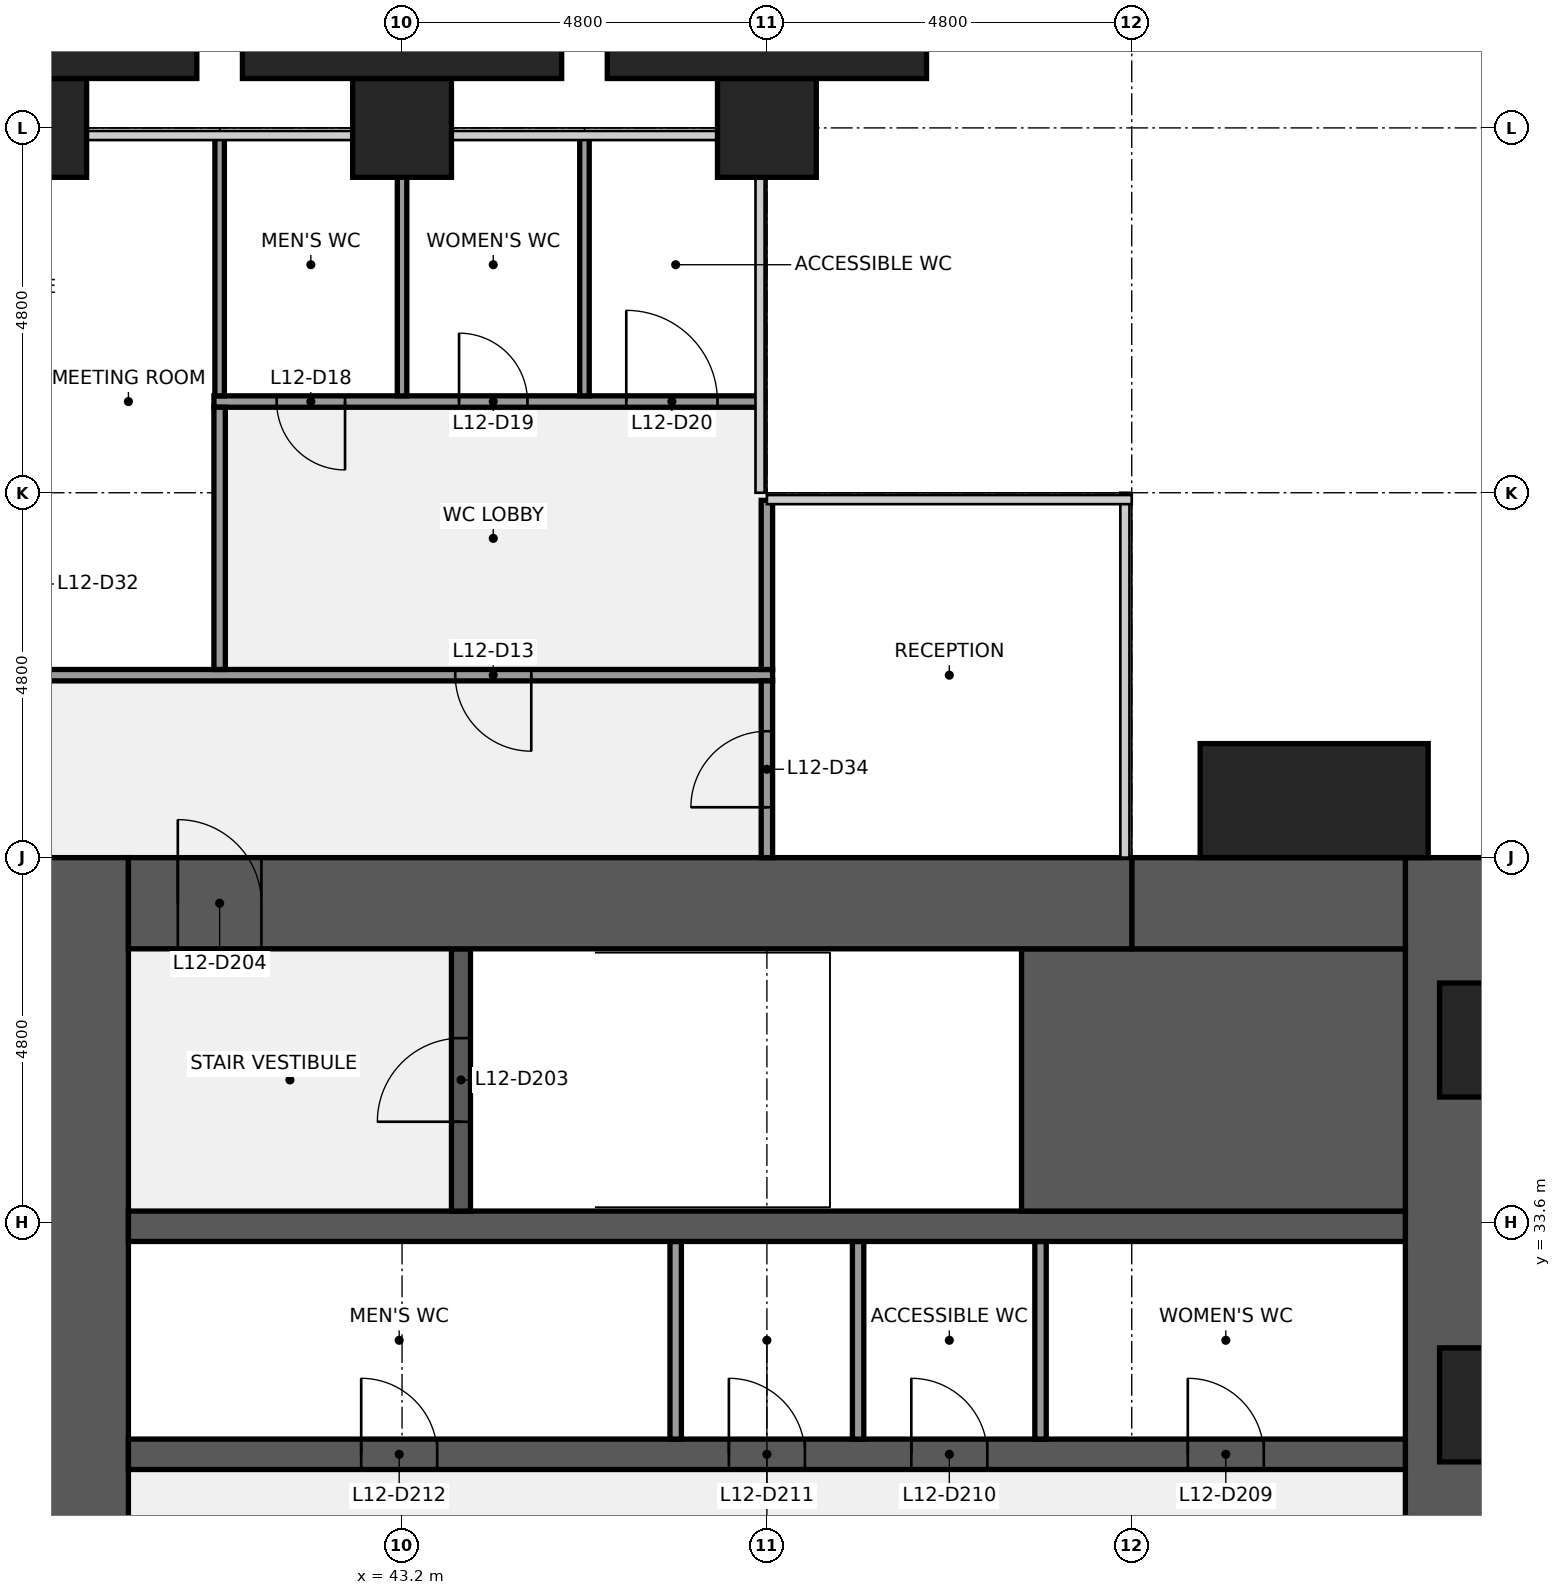
"""IFC4 building model, lengths in metres.
Left out: names, types, materials, properties, quantities, classifications, styles, units other than length and angle.
Written with IfcOpenShell. Run it as: python <this file> out.ifc"""

import sys

from ifc_helpers import new_model, si_unit, direction, frame, frame_2d, origin, origin_2d, place, context, subcontext, project, spatial, rectangle, extrude, element, fill, save


model = new_model("IFC4")
c1 = context("Model", 3, precision=1e-05, world=origin(), true_north=direction((0.0, 1.0)))
c2 = subcontext(c1, "Body", "Model", "MODEL_VIEW")
j1 = project(units=[si_unit("LENGTHUNIT", "METRE"), si_unit("PLANEANGLEUNIT", "RADIAN")], contexts=[c1])
p1 = place(None, origin())
s1 = spatial("IfcSite", under=j1, at=p1, CompositionType="ELEMENT")
p2 = place(p1, origin())
s2 = spatial("IfcBuilding", under=s1, at=p2, CompositionType="ELEMENT")
p3 = place(p2, frame((0.0, 0.0, 59.0)))
s3 = spatial("IfcBuildingStorey", under=s2, at=p3, CompositionType="ELEMENT", Elevation=59.0)
for number, where, z_axis, x_axis in (
    (1, (38.4, 48.0, 0.0), (0.0, 0.0, 1.0), (1.0, 0.0, 0.0)),
    (2, (43.2, 48.0, 0.0), (0.0, 0.0, 1.0), (1.0, 0.0, 0.0)),
    (3, (48.0, 48.0, 0.0), (0.0, 0.0, 1.0), (1.0, 0.0, 0.0)),
):
    element("IfcColumn", number, at=place(p3, frame(where, z_axis=z_axis, x_axis=x_axis)), inside=s3, PredefinedType="COLUMN", context=c2, shape_type="SweptSolid", body=[
        extrude(rectangle(XDim=1.3, YDim=1.3, at=origin_2d()), origin(), (0.0, 0.0, 1.0), 4.0),
    ])
p4 = place(p3, frame((57.0, 38.4, 0.0), z_axis=(0.0, 0.0, 1.0), x_axis=(0.0, -1.0, 0.0)))
e4 = element("IfcWall", 4, at=p4, inside=s3, PredefinedType="SHEAR", context=c2, shape_type="SweptSolid", body=[
    extrude(rectangle(XDim=28.8, YDim=1.2, at=frame_2d((14.4, 0.0))), origin(), (0.0, 0.0, 1.0), 3.84),
])
p5 = place(p4, frame((18.45, 0.0, 0.9)))
e5 = element("IfcOpeningElement", 5, at=p5, cuts=e4, PredefinedType="OPENING", context=c2, shape_type="SweptSolid", body=[
    extrude(rectangle(XDim=1.5, YDim=1.5, at=frame_2d((0.75, 0.75))), frame((0.0, 0.61, 0.0), z_axis=(0.0, -1.0, 0.0), x_axis=(1.0, 0.0, 0.0)), (0.0, 0.0, 1.0), 1.22),
])
p6 = place(p4, frame((8.85, 0.0, 0.9)))
e6 = element("IfcOpeningElement", 6, at=p6, cuts=e4, PredefinedType="OPENING", context=c2, shape_type="SweptSolid", body=[
    extrude(rectangle(XDim=1.5, YDim=1.5, at=frame_2d((0.75, 0.75))), frame((0.0, 0.61, 0.0), z_axis=(0.0, -1.0, 0.0), x_axis=(1.0, 0.0, 0.0)), (0.0, 0.0, 1.0), 1.22),
])
p7 = place(p3, frame((39.0, 9.6, 0.0), z_axis=(0.0, 0.0, 1.0), x_axis=(0.0, 1.0, 0.0)))
e7 = element("IfcWall", 7, at=p7, inside=s3, PredefinedType="SHEAR", context=c2, shape_type="SweptSolid", body=[
    extrude(rectangle(XDim=28.8, YDim=1.2, at=frame_2d((14.4, 0.0))), origin(), (0.0, 0.0, 1.0), 3.84),
])
p8 = place(p7, frame((8.7, 0.0, 0.0)))
e8 = element("IfcOpeningElement", 8, at=p8, cuts=e7, PredefinedType="OPENING", context=c2, shape_type="SweptSolid", body=[
    extrude(rectangle(XDim=1.8, YDim=2.1, at=frame_2d((0.9, 1.05))), frame((0.0, 0.61, 0.0), z_axis=(0.0, -1.0, 0.0), x_axis=(1.0, 0.0, 0.0)), (0.0, 0.0, 1.0), 1.22),
])
p9 = place(p7, frame((18.3, 0.0, 0.0)))
e9 = element("IfcOpeningElement", 9, at=p9, cuts=e7, PredefinedType="OPENING", context=c2, shape_type="SweptSolid", body=[
    extrude(rectangle(XDim=1.8, YDim=2.1, at=frame_2d((0.9, 1.05))), frame((0.0, 0.61, 0.0), z_axis=(0.0, -1.0, 0.0), x_axis=(1.0, 0.0, 0.0)), (0.0, 0.0, 1.0), 1.22),
])
p10 = place(p3, frame((39.6, 30.55, 0.0), z_axis=(0.0, 0.0, 1.0), x_axis=(1.0, 0.0, 0.0)))
e10 = element("IfcWall", 10, at=p10, inside=s3, PredefinedType="SHEAR", context=c2, shape_type="SweptSolid", body=[
    extrude(rectangle(XDim=16.8, YDim=0.4, at=frame_2d((8.4, 0.0))), origin(), (0.0, 0.0, 1.0), 3.84),
])
p11 = place(p10, frame((13.938, 0.0, 0.0)))
e11 = element("IfcOpeningElement", 11, at=p11, cuts=e10, PredefinedType="OPENING", context=c2, shape_type="SweptSolid", body=[
    extrude(rectangle(XDim=1.0, YDim=2.1, at=frame_2d((0.5, 1.05))), frame((0.0, 0.21, 0.0), z_axis=(0.0, -1.0, 0.0), x_axis=(1.0, 0.0, 0.0)), (0.0, 0.0, 1.0), 0.42),
])
p12 = place(p10, frame((10.3, 0.0, 0.0)))
e12 = element("IfcOpeningElement", 12, at=p12, cuts=e10, PredefinedType="OPENING", context=c2, shape_type="SweptSolid", body=[
    extrude(rectangle(XDim=1.0, YDim=2.1, at=frame_2d((0.5, 1.05))), frame((0.0, 0.21, 0.0), z_axis=(0.0, -1.0, 0.0), x_axis=(1.0, 0.0, 0.0)), (0.0, 0.0, 1.0), 0.42),
])
p13 = place(p10, frame((7.9, 0.0, 0.0)))
e13 = element("IfcOpeningElement", 13, at=p13, cuts=e10, PredefinedType="OPENING", context=c2, shape_type="SweptSolid", body=[
    extrude(rectangle(XDim=1.0, YDim=2.1, at=frame_2d((0.5, 1.05))), frame((0.0, 0.21, 0.0), z_axis=(0.0, -1.0, 0.0), x_axis=(1.0, 0.0, 0.0)), (0.0, 0.0, 1.0), 0.42),
])
p14 = place(p10, frame((3.062, 0.0, 0.0)))
e14 = element("IfcOpeningElement", 14, at=p14, cuts=e10, PredefinedType="OPENING", context=c2, shape_type="SweptSolid", body=[
    extrude(rectangle(XDim=1.0, YDim=2.1, at=frame_2d((0.5, 1.05))), frame((0.0, 0.21, 0.0), z_axis=(0.0, -1.0, 0.0), x_axis=(1.0, 0.0, 0.0)), (0.0, 0.0, 1.0), 0.42),
])
for number, where, z_axis, x_axis in (
    (15, (51.6, 30.75, 0.0), (0.0, 0.0, 1.0), (0.0, 1.0, 0.0)),
    (16, (49.2, 30.75, 0.0), (0.0, 0.0, 1.0), (0.0, 1.0, 0.0)),
    (17, (46.8, 30.75, 0.0), (0.0, 0.0, 1.0), (0.0, 1.0, 0.0)),
):
    element("IfcWall", number, at=place(p3, frame(where, z_axis=z_axis, x_axis=x_axis)), inside=s3, PredefinedType="PARTITIONING", context=c2, shape_type="SweptSolid", body=[
        extrude(rectangle(XDim=2.6, YDim=0.15, at=frame_2d((1.3, 0.0))), origin(), (0.0, 0.0, 1.0), 3.84),
    ])
p15 = place(p3, frame((39.6, 33.55, 0.0), z_axis=(0.0, 0.0, 1.0), x_axis=(1.0, 0.0, 0.0)))
e18 = element("IfcWall", 18, at=p15, inside=s3, PredefinedType="SHEAR", context=c2, shape_type="SweptSolid", body=[
    extrude(rectangle(XDim=16.8, YDim=0.4, at=frame_2d((8.4, 0.0))), origin(), (0.0, 0.0, 1.0), 3.84),
])
p16 = place(p3, frame((51.35, 35.475, 0.0), z_axis=(0.0, 0.0, 1.0), x_axis=(1.0, 0.0, 0.0)))
e19 = element("IfcWall", 19, at=p16, inside=s3, PredefinedType="SHEAR", context=c2, shape_type="SweptSolid", body=[
    extrude(rectangle(XDim=5.05, YDim=3.45, at=frame_2d((2.525, 0.0))), origin(), (0.0, 0.0, 1.0), 3.84),
])
p17 = place(p3, frame((43.975, 33.75, 0.0), z_axis=(0.0, 0.0, 1.0), x_axis=(0.0, 1.0, 0.0)))
e20 = element("IfcWall", 20, at=p17, inside=s3, PredefinedType="SHEAR", context=c2, shape_type="SweptSolid", body=[
    extrude(rectangle(XDim=3.45, YDim=0.25, at=frame_2d((1.725, 0.0))), origin(), (0.0, 0.0, 1.0), 3.84),
])
p18 = place(p17, frame((1.175, 0.0, 0.0)))
e21 = element("IfcOpeningElement", 21, at=p18, cuts=e20, PredefinedType="OPENING", context=c2, shape_type="SweptSolid", body=[
    extrude(rectangle(XDim=1.1, YDim=2.1, at=frame_2d((0.55, 1.05))), frame((0.0, 0.135, 0.0), z_axis=(0.0, -1.0, 0.0), x_axis=(1.0, 0.0, 0.0)), (0.0, 0.0, 1.0), 0.27),
])
p19 = place(p3, frame((52.8, 37.8, 0.0), z_axis=(0.0, 0.0, 1.0), x_axis=(1.0, 0.0, 0.0)))
e22 = element("IfcWall", 22, at=p19, inside=s3, PredefinedType="SHEAR", context=c2, shape_type="SweptSolid", body=[
    extrude(rectangle(XDim=3.6, YDim=1.2, at=frame_2d((1.8, 0.0))), origin(), (0.0, 0.0, 1.0), 3.84),
])
p20 = place(p3, frame((39.6, 37.8, 0.0), z_axis=(0.0, 0.0, 1.0), x_axis=(1.0, 0.0, 0.0)))
e23 = element("IfcWall", 23, at=p20, inside=s3, PredefinedType="SHEAR", context=c2, shape_type="SweptSolid", body=[
    extrude(rectangle(XDim=13.2, YDim=1.2, at=frame_2d((6.6, 0.0))), origin(), (0.0, 0.0, 1.0), 3.84),
])
p21 = place(p20, frame((0.65, 0.0, 0.0)))
e24 = element("IfcOpeningElement", 24, at=p21, cuts=e23, PredefinedType="OPENING", context=c2, shape_type="SweptSolid", body=[
    extrude(rectangle(XDim=1.1, YDim=2.1, at=frame_2d((0.55, 1.05))), frame((0.0, 0.61, 0.0), z_axis=(0.0, -1.0, 0.0), x_axis=(1.0, 0.0, 0.0)), (0.0, 0.0, 1.0), 1.22),
])
p22 = place(p3, frame((38.325, 40.8, 0.0), z_axis=(0.0, 0.0, 1.0), x_axis=(1.0, 0.0, 0.0)))
e25 = element("IfcWall", 25, at=p22, inside=s3, PredefinedType="PARTITIONING", context=c2, shape_type="SweptSolid", body=[
    extrude(rectangle(XDim=9.75, YDim=0.15, at=frame_2d((4.875, 0.0))), origin(), (0.0, 0.0, 1.0), 2.87),
])
p23 = place(p22, frame((5.575, 0.0, 0.0)))
e26 = element("IfcOpeningElement", 26, at=p23, cuts=e25, PredefinedType="OPENING", context=c2, shape_type="SweptSolid", body=[
    extrude(rectangle(XDim=1.0, YDim=2.1, at=frame_2d((0.5, 1.05))), frame((0.0, 0.085, 0.0), z_axis=(0.0, -1.0, 0.0), x_axis=(1.0, 0.0, 0.0)), (0.0, 0.0, 1.0), 0.17),
])
p24 = place(p3, frame((40.725, 44.4, 0.0), z_axis=(0.0, 0.0, 1.0), x_axis=(1.0, 0.0, 0.0)))
e27 = element("IfcWall", 27, at=p24, inside=s3, PredefinedType="PARTITIONING", context=c2, shape_type="SweptSolid", body=[
    extrude(rectangle(XDim=7.175, YDim=0.15, at=frame_2d((3.587, 0.0))), origin(), (0.0, 0.0, 1.0), 2.87),
])
p25 = place(p24, frame((0.825, 0.0, 0.0)))
e28 = element("IfcOpeningElement", 28, at=p25, cuts=e27, PredefinedType="OPENING", context=c2, shape_type="SweptSolid", body=[
    extrude(rectangle(XDim=0.9, YDim=2.1, at=frame_2d((0.45, 1.05))), frame((0.0, 0.085, 0.0), z_axis=(0.0, -1.0, 0.0), x_axis=(1.0, 0.0, 0.0)), (0.0, 0.0, 1.0), 0.17),
])
p26 = place(p24, frame((3.225, 0.0, 0.0)))
e29 = element("IfcOpeningElement", 29, at=p26, cuts=e27, PredefinedType="OPENING", context=c2, shape_type="SweptSolid", body=[
    extrude(rectangle(XDim=0.9, YDim=2.1, at=frame_2d((0.45, 1.05))), frame((0.0, 0.085, 0.0), z_axis=(0.0, -1.0, 0.0), x_axis=(1.0, 0.0, 0.0)), (0.0, 0.0, 1.0), 0.17),
])
p27 = place(p24, frame((5.425, 0.0, 0.0)))
e30 = element("IfcOpeningElement", 30, at=p27, cuts=e27, PredefinedType="OPENING", context=c2, shape_type="SweptSolid", body=[
    extrude(rectangle(XDim=1.2, YDim=2.1, at=frame_2d((0.6, 1.05))), frame((0.0, 0.085, 0.0), z_axis=(0.0, -1.0, 0.0), x_axis=(1.0, 0.0, 0.0)), (0.0, 0.0, 1.0), 0.17),
])
p28 = place(p3, frame((40.8, 44.475, 0.0), z_axis=(0.0, 0.0, 1.0), x_axis=(0.0, 1.0, 0.0)))
e31 = element("IfcWall", 31, at=p28, inside=s3, PredefinedType="PARTITIONING", context=c2, shape_type="SweptSolid", body=[
    extrude(rectangle(XDim=3.425, YDim=0.125, at=frame_2d((1.712, 0.0))), origin(), (0.0, 0.0, 1.0), 2.87),
])
p29 = place(p3, frame((40.8, 40.875, 0.0), z_axis=(0.0, 0.0, 1.0), x_axis=(0.0, 1.0, 0.0)))
e32 = element("IfcWall", 32, at=p29, inside=s3, PredefinedType="PARTITIONING", context=c2, shape_type="SweptSolid", body=[
    extrude(rectangle(XDim=3.45, YDim=0.15, at=frame_2d((1.725, 0.0))), origin(), (0.0, 0.0, 1.0), 2.87),
])
p30 = place(p3, frame((43.2, 44.475, 0.0), z_axis=(0.0, 0.0, 1.0), x_axis=(0.0, 1.0, 0.0)))
e33 = element("IfcWall", 33, at=p30, inside=s3, PredefinedType="PARTITIONING", context=c2, shape_type="SweptSolid", body=[
    extrude(rectangle(XDim=2.875, YDim=0.125, at=frame_2d((1.438, 0.0))), origin(), (0.0, 0.0, 1.0), 2.87),
])
p31 = place(p3, frame((45.6, 44.475, 0.0), z_axis=(0.0, 0.0, 1.0), x_axis=(0.0, 1.0, 0.0)))
e34 = element("IfcWall", 34, at=p31, inside=s3, PredefinedType="PARTITIONING", context=c2, shape_type="SweptSolid", body=[
    extrude(rectangle(XDim=3.425, YDim=0.125, at=frame_2d((1.712, 0.0))), origin(), (0.0, 0.0, 1.0), 2.87),
])
p32 = place(p3, frame((48.0, 38.4, 0.0), z_axis=(0.0, 0.0, 1.0), x_axis=(0.0, 1.0, 0.0)))
e35 = element("IfcWall", 35, at=p32, inside=s3, PredefinedType="PARTITIONING", context=c2, shape_type="SweptSolid", body=[
    extrude(rectangle(XDim=2.325, YDim=0.15, at=frame_2d((1.163, 0.0))), origin(), (0.0, 0.0, 1.0), 2.87),
])
p33 = place(p32, frame((0.663, 0.0, 0.0)))
e36 = element("IfcOpeningElement", 36, at=p33, cuts=e35, PredefinedType="OPENING", context=c2, shape_type="SweptSolid", body=[
    extrude(rectangle(XDim=1.0, YDim=2.1, at=frame_2d((0.5, 1.05))), frame((0.0, 0.085, 0.0), z_axis=(0.0, -1.0, 0.0), x_axis=(1.0, 0.0, 0.0)), (0.0, 0.0, 1.0), 0.17),
])
p34 = place(p3, frame((48.0, 40.875, 0.0), z_axis=(0.0, 0.0, 1.0), x_axis=(0.0, 1.0, 0.0)))
e37 = element("IfcWall", 37, at=p34, inside=s3, PredefinedType="PARTITIONING", context=c2, shape_type="SweptSolid", body=[
    extrude(rectangle(XDim=2.225, YDim=0.15, at=frame_2d((1.113, 0.0))), origin(), (0.0, 0.0, 1.0), 2.87),
])
p35 = place(p3, frame((55.2, 39.15, 0.0), z_axis=(0.0, 0.0, 1.0), x_axis=(1.0, 0.0, 0.0)))
e38 = element("IfcColumn", 38, at=p35, inside=s3, PredefinedType="PILASTER", context=c2, shape_type="SweptSolid", body=[
    extrude(rectangle(XDim=3.0, YDim=1.5, at=origin_2d()), origin(), (0.0, 0.0, 1.0), 4.0),
])
for number, where, z_axis, x_axis in (
    (39, (38.4, 49.075, 0.0), (0.0, 0.0, 1.0), (1.0, 0.0, 0.0)),
    (40, (43.2, 49.075, 0.0), (0.0, 0.0, 1.0), (1.0, 0.0, 0.0)),
    (41, (48.0, 49.075, 0.0), (0.0, 0.0, 1.0), (1.0, 0.0, 0.0)),
):
    element("IfcColumn", number, at=place(p3, frame(where, z_axis=z_axis, x_axis=x_axis)), inside=s3, PredefinedType="PILASTER", context=c2, shape_type="SweptSolid", body=[
        extrude(rectangle(XDim=4.2, YDim=0.85, at=origin_2d()), origin(), (0.0, 0.0, 1.0), 4.0),
    ])
p36 = place(p18, origin())
e42 = element("IfcDoor", 42, at=p36, inside=s3, OperationType="SINGLE_SWING_LEFT", PredefinedType="DOOR", context=c2, shape_type="SweptSolid", body=[
    extrude(rectangle(XDim=1.1, YDim=2.1, at=frame_2d((0.55, 1.05))), frame((0.0, 0.025, 0.0), z_axis=(0.0, -1.0, 0.0), x_axis=(1.0, 0.0, 0.0)), (0.0, 0.0, 1.0), 0.05),
])
fill(e21, e42)
p37 = place(p21, origin())
e43 = element("IfcDoor", 43, at=p37, inside=s3, OperationType="SINGLE_SWING_LEFT", PredefinedType="DOOR", context=c2, shape_type="SweptSolid", body=[
    extrude(rectangle(XDim=1.1, YDim=2.1, at=frame_2d((0.55, 1.05))), frame((0.0, 0.025, 0.0), z_axis=(0.0, -1.0, 0.0), x_axis=(1.0, 0.0, 0.0)), (0.0, 0.0, 1.0), 0.05),
])
fill(e24, e43)
p38 = place(p11, origin())
e44 = element("IfcDoor", 44, at=p38, inside=s3, OperationType="SINGLE_SWING_LEFT", PredefinedType="DOOR", context=c2, shape_type="SweptSolid", body=[
    extrude(rectangle(XDim=1.0, YDim=2.1, at=frame_2d((0.5, 1.05))), frame((0.0, 0.025, 0.0), z_axis=(0.0, -1.0, 0.0), x_axis=(1.0, 0.0, 0.0)), (0.0, 0.0, 1.0), 0.05),
])
fill(e11, e44)
p39 = place(p12, origin())
e45 = element("IfcDoor", 45, at=p39, inside=s3, OperationType="SINGLE_SWING_LEFT", PredefinedType="DOOR", context=c2, shape_type="SweptSolid", body=[
    extrude(rectangle(XDim=1.0, YDim=2.1, at=frame_2d((0.5, 1.05))), frame((0.0, 0.025, 0.0), z_axis=(0.0, -1.0, 0.0), x_axis=(1.0, 0.0, 0.0)), (0.0, 0.0, 1.0), 0.05),
])
fill(e12, e45)
p40 = place(p13, origin())
e46 = element("IfcDoor", 46, at=p40, inside=s3, OperationType="SINGLE_SWING_LEFT", PredefinedType="DOOR", context=c2, shape_type="SweptSolid", body=[
    extrude(rectangle(XDim=1.0, YDim=2.1, at=frame_2d((0.5, 1.05))), frame((0.0, 0.025, 0.0), z_axis=(0.0, -1.0, 0.0), x_axis=(1.0, 0.0, 0.0)), (0.0, 0.0, 1.0), 0.05),
])
fill(e13, e46)
p41 = place(p14, origin())
e47 = element("IfcDoor", 47, at=p41, inside=s3, OperationType="SINGLE_SWING_LEFT", PredefinedType="DOOR", context=c2, shape_type="SweptSolid", body=[
    extrude(rectangle(XDim=1.0, YDim=2.1, at=frame_2d((0.5, 1.05))), frame((0.0, 0.025, 0.0), z_axis=(0.0, -1.0, 0.0), x_axis=(1.0, 0.0, 0.0)), (0.0, 0.0, 1.0), 0.05),
])
fill(e14, e47)
p42 = place(p23, origin())
e48 = element("IfcDoor", 48, at=p42, inside=s3, OperationType="SINGLE_SWING_RIGHT", PredefinedType="DOOR", context=c2, shape_type="SweptSolid", body=[
    extrude(rectangle(XDim=1.0, YDim=2.1, at=frame_2d((0.5, 1.05))), frame((0.0, 0.025, 0.0), z_axis=(0.0, -1.0, 0.0), x_axis=(1.0, 0.0, 0.0)), (0.0, 0.0, 1.0), 0.05),
])
fill(e26, e48)
p43 = place(p25, origin())
e49 = element("IfcDoor", 49, at=p43, inside=s3, OperationType="SINGLE_SWING_RIGHT", PredefinedType="DOOR", context=c2, shape_type="SweptSolid", body=[
    extrude(rectangle(XDim=0.9, YDim=2.1, at=frame_2d((0.45, 1.05))), frame((0.0, 0.025, 0.0), z_axis=(0.0, -1.0, 0.0), x_axis=(1.0, 0.0, 0.0)), (0.0, 0.0, 1.0), 0.05),
])
fill(e28, e49)
p44 = place(p26, origin())
e50 = element("IfcDoor", 50, at=p44, inside=s3, OperationType="SINGLE_SWING_LEFT", PredefinedType="DOOR", context=c2, shape_type="SweptSolid", body=[
    extrude(rectangle(XDim=0.9, YDim=2.1, at=frame_2d((0.45, 1.05))), frame((0.0, 0.025, 0.0), z_axis=(0.0, -1.0, 0.0), x_axis=(1.0, 0.0, 0.0)), (0.0, 0.0, 1.0), 0.05),
])
fill(e29, e50)
p45 = place(p27, origin())
e51 = element("IfcDoor", 51, at=p45, inside=s3, OperationType="SINGLE_SWING_LEFT", PredefinedType="DOOR", context=c2, shape_type="SweptSolid", body=[
    extrude(rectangle(XDim=1.2, YDim=2.1, at=frame_2d((0.6, 1.05))), frame((0.0, 0.025, 0.0), z_axis=(0.0, -1.0, 0.0), x_axis=(1.0, 0.0, 0.0)), (0.0, 0.0, 1.0), 0.05),
])
fill(e30, e51)
p46 = place(p33, origin())
e52 = element("IfcDoor", 52, at=p46, inside=s3, OperationType="SINGLE_SWING_LEFT", PredefinedType="DOOR", context=c2, shape_type="SweptSolid", body=[
    extrude(rectangle(XDim=1.0, YDim=2.1, at=frame_2d((0.5, 1.05))), frame((0.0, 0.025, 0.0), z_axis=(0.0, -1.0, 0.0), x_axis=(1.0, 0.0, 0.0)), (0.0, 0.0, 1.0), 0.05),
])
fill(e36, e52)
save(model, sys.argv[1])
